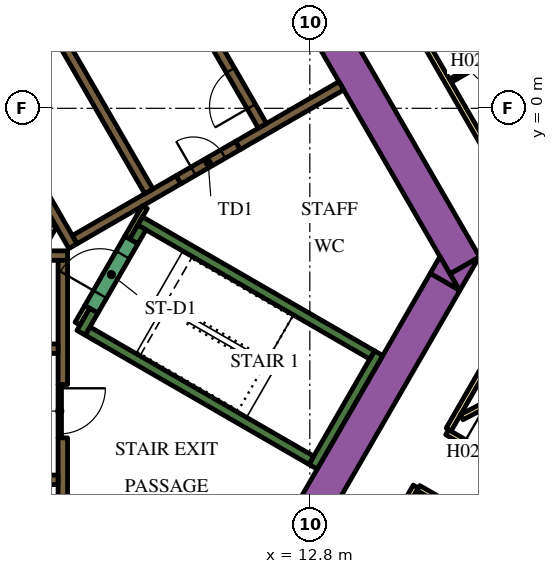
"""IFC4 building model, lengths in metres.
Left out: names, types, materials, properties, quantities, classifications, styles, units other than length and angle.
Written with IfcOpenShell. Run it as: python <this file> out.ifc"""

import sys

from ifc_helpers import new_model, si_unit, direction, frame, frame_2d, origin, place, context, subcontext, project, spatial, polyline, rectangle, outline, extrude, element, fill, save


model = new_model("IFC4")
c1 = context("Model", 3, precision=1e-05, world=origin(), true_north=direction((0.0, 1.0)))
c2 = subcontext(c1, "Body", "Model", "MODEL_VIEW")
j1 = project(units=[si_unit("LENGTHUNIT", "METRE"), si_unit("PLANEANGLEUNIT", "RADIAN")], contexts=[c1])
p1 = place(None, origin())
s1 = spatial("IfcSite", under=j1, at=p1, CompositionType="ELEMENT")
p2 = place(p1, origin())
s2 = spatial("IfcBuilding", under=s1, at=p2, CompositionType="ELEMENT")
p3 = place(p2, frame((0.0, 0.0, 39.3)))
s3 = spatial("IfcBuildingStorey", under=s2, at=p3, CompositionType="ELEMENT", Elevation=39.3)
p4 = place(p3, frame((6.711, 13.476, 0.0), z_axis=(0.0, 0.0, 1.0), x_axis=(0.500002723396, -0.866023831425, 0.0)))
e1 = element("IfcWall", 1, at=p4, inside=s3, PredefinedType="SOLIDWALL", context=c2, shape_type="SweptSolid", body=[
    extrude(rectangle(XDim=20.334, YDim=0.9, at=frame_2d((10.167, 0.0))), origin(), (0.0, 0.0, 1.0), 3.9),
])
p5 = place(p3, origin())
e2 = element("IfcWall", 2, at=p5, inside=s3, PredefinedType="SOLIDWALL", context=c2, shape_type="SweptSolid", body=[
    extrude(outline(polyline([(16.743, -4.8), (16.489, -4.36), (17.251, -3.92), (16.743, -4.8)])), origin(), (0.0, 0.0, 1.0), 3.9),
])
p6 = place(p3, frame((11.695, -12.644, 0.0), z_axis=(0.0, 0.0, 1.0), x_axis=(0.500010229568, 0.86601949766, 0.0)))
e3 = element("IfcWall", 3, at=p6, inside=s3, PredefinedType="SOLIDWALL", context=c2, shape_type="SweptSolid", body=[
    extrude(rectangle(XDim=9.326, YDim=0.9, at=frame_2d((4.663, 0.0))), origin(), (0.0, 0.0, 1.0), 3.9),
])
e4 = element("IfcWall", 4, at=p5, inside=s3, PredefinedType="SOLIDWALL", context=c2, shape_type="SweptSolid", body=[
    extrude(outline(polyline([(16.223, -3.9), (16.732, -4.78), (15.969, -4.34), (16.223, -3.9)])), origin(), (0.0, 0.0, 1.0), 3.9),
])
p7 = place(p3, frame((12.885, -9.431, 0.0), z_axis=(0.0, 0.0, 1.0), x_axis=(0.500020560727, 0.866013532718, 0.0)))
e5 = element("IfcWall", 5, at=p7, inside=s3, PredefinedType="SOLIDWALL", context=c2, shape_type="SweptSolid", body=[
    extrude(rectangle(XDim=3.45, YDim=0.25, at=frame_2d((1.725, 0.0))), origin(), (0.0, 0.0, 1.0), 3.9),
])
p8 = place(p3, frame((12.84, -9.261, 0.0), z_axis=(0.0, 0.0, 1.0), x_axis=(-0.866013990052, 0.500019768644, 0.0)))
e6 = element("IfcWall", 6, at=p8, inside=s3, PredefinedType="SOLIDWALL", context=c2, shape_type="SweptSolid", body=[
    extrude(rectangle(XDim=6.8, YDim=0.25, at=frame_2d((3.4, 0.0))), origin(), (0.0, 0.0, 1.0), 3.9),
])
p9 = place(p3, frame((6.78, -5.906, 0.0), z_axis=(0.0, 0.0, 1.0), x_axis=(0.500223362819, 0.865896406789, 0.0)))
e7 = element("IfcWall", 7, at=p9, inside=s3, PredefinedType="SOLIDWALL", context=c2, shape_type="SweptSolid", body=[
    extrude(rectangle(XDim=0.675, YDim=0.25, at=frame_2d((0.337, 0.0))), origin(), (0.0, 0.0, 1.0), 3.9),
])
p10 = place(p3, frame((8.334, -2.964, 0.0), z_axis=(0.0, 0.0, 1.0), x_axis=(0.866016039709, -0.500016218704, 0.0)))
e8 = element("IfcWall", 8, at=p10, inside=s3, PredefinedType="SOLIDWALL", context=c2, shape_type="SweptSolid", body=[
    extrude(rectangle(XDim=7.05, YDim=0.25, at=frame_2d((3.525, 0.0))), origin(), (0.0, 0.0, 1.0), 3.9),
])
p11 = place(p3, frame((8.168, -3.503, 0.0), z_axis=(0.0, 0.0, 1.0), x_axis=(0.49972245349, 0.866185586049, 0.0)))
e9 = element("IfcWall", 9, at=p11, inside=s3, PredefinedType="SOLIDWALL", context=c2, shape_type="SweptSolid", body=[
    extrude(rectangle(XDim=0.425, YDim=0.25, at=frame_2d((0.212, 0.0))), origin(), (0.0, 0.0, 1.0), 3.9),
])
p12 = place(p3, frame((-5.545, -3.875, 0.0), z_axis=(0.0, 0.0, 1.0), x_axis=(1.0, 0.0, 0.0)))
e10 = element("IfcWall", 10, at=p12, inside=s3, PredefinedType="SOLIDWALL", context=c2, shape_type="SweptSolid", body=[
    extrude(rectangle(XDim=11.97, YDim=0.25, at=frame_2d((5.985, 0.0))), origin(), (0.0, 0.0, 1.0), 3.9),
])
p13 = place(p3, frame((6.3, -8.67, 0.0), z_axis=(0.0, 0.0, 1.0), x_axis=(0.0, -1.0, 0.0)))
e11 = element("IfcWall", 11, at=p13, inside=s3, PredefinedType="SOLIDWALL", context=c2, shape_type="SweptSolid", body=[
    extrude(rectangle(XDim=3.43, YDim=0.25, at=frame_2d((1.715, 0.0))), origin(), (0.0, 0.0, 1.0), 3.9),
])
p14 = place(p3, frame((6.3, -7.268, 0.0), z_axis=(0.0, 0.0, 1.0), x_axis=(0.0, 1.0, 0.0)))
e12 = element("IfcWall", 12, at=p14, inside=s3, PredefinedType="SOLIDWALL", context=c2, shape_type="SweptSolid", body=[
    extrude(rectangle(XDim=3.268, YDim=0.25, at=frame_2d((1.634, 0.0))), origin(), (0.0, 0.0, 1.0), 3.9),
])
p15 = place(p3, frame((13.629, 0.594, 0.0), z_axis=(0.0, 0.0, 1.0), x_axis=(-0.86602790099, -0.499995674689, 0.0)))
e13 = element("IfcWall", 13, at=p15, inside=s3, PredefinedType="SOLIDWALL", context=c2, shape_type="SweptSolid", body=[
    extrude(rectangle(XDim=3.146, YDim=0.25, at=frame_2d((1.573, 0.0))), origin(), (0.0, 0.0, 1.0), 3.9),
])
e14 = element("IfcWall", 14, at=p5, inside=s3, PredefinedType="SOLIDWALL", context=c2, shape_type="SweptSolid", body=[
    extrude(outline(polyline([(0.566, 6.725), (0.566, 6.875), (0.566, 6.875), (0.565, 6.875), (0.361, 6.875), (0.035, 7.439), (0.252, 7.564), (0.377, 7.348), (6.552, -3.348), (6.677, -3.564), (6.46, -3.689), (0.448, 6.725), (0.565, 6.725), (0.566, 6.725), (0.566, 6.725)])), origin(), (0.0, 0.0, 1.0), 3.9),
])
p16 = place(p3, frame((6.614, -3.456, 0.0), z_axis=(0.0, 0.0, 1.0), x_axis=(0.86602447079, 0.500001615989, 0.0)))
e15 = element("IfcWall", 15, at=p16, inside=s3, PredefinedType="SOLIDWALL", context=c2, shape_type="SweptSolid", body=[
    extrude(rectangle(XDim=3.154, YDim=0.25, at=frame_2d((1.577, 0.0))), origin(), (0.0, 0.0, 1.0), 3.9),
])
p17 = place(p3, frame((6.945, -5.222, 0.0), z_axis=(0.0, 0.0, 1.0), x_axis=(-0.499818422106, -0.866130212453, 0.0)))
e16 = element("IfcWall", 16, at=p17, inside=s3, PredefinedType="PARTITIONING", context=c2, shape_type="SweptSolid", body=[
    extrude(rectangle(XDim=0.514, YDim=0.15, at=frame_2d((0.257, 0.0))), origin(), (0.0, 0.0, 1.0), 2.75),
])
p18 = place(p3, frame((5.705, -3.718, 0.0), z_axis=(0.0, 0.0, 1.0), x_axis=(0.499962090823, 0.866047289552, 0.0)))
e17 = element("IfcWall", 17, at=p18, inside=s3, PredefinedType="PARTITIONING", context=c2, shape_type="SweptSolid", body=[
    extrude(rectangle(XDim=0.735, YDim=0.15, at=frame_2d((0.367, 0.0))), origin(), (0.0, 0.0, 1.0), 2.75),
])
p19 = place(p3, frame((8.459, -2.599, 0.0), z_axis=(0.0, 0.0, 1.0), x_axis=(-0.500041054325, -0.866001699761, 0.0)))
e18 = element("IfcWall", 18, at=p19, inside=s3, PredefinedType="PARTITIONING", context=c2, shape_type="SweptSolid", body=[
    extrude(rectangle(XDim=0.929, YDim=0.15, at=frame_2d((0.464, 0.0))), origin(), (0.0, 0.0, 1.0), 3.9),
])
p20 = place(p3, frame((-6.175, -9.775, 0.0), z_axis=(0.0, 0.0, 1.0), x_axis=(1.0, 0.0, 0.0)))
e19 = element("IfcWall", 19, at=p20, inside=s3, PredefinedType="SOLIDWALL", context=c2, shape_type="SweptSolid", body=[
    extrude(rectangle(XDim=12.35, YDim=0.25, at=frame_2d((6.175, 0.0))), origin(), (0.0, 0.0, 1.0), 3.9),
])
p21 = place(p20, frame((0.585, 0.0, 0.0)))
e20 = element("IfcOpeningElement", 20, at=p21, cuts=e19, PredefinedType="OPENING", context=c2, shape_type="SweptSolid", body=[
    extrude(rectangle(XDim=1.1, YDim=2.1, at=frame_2d((0.55, 1.05))), frame((0.0, 0.135, 0.0), z_axis=(0.0, -1.0, 0.0), x_axis=(1.0, 0.0, 0.0)), (0.0, 0.0, 1.0), 0.27),
])
p22 = place(p20, frame((3.105, 0.0, 0.0)))
e21 = element("IfcOpeningElement", 21, at=p22, cuts=e19, PredefinedType="OPENING", context=c2, shape_type="SweptSolid", body=[
    extrude(rectangle(XDim=1.1, YDim=2.1, at=frame_2d((0.55, 1.05))), frame((0.0, 0.135, 0.0), z_axis=(0.0, -1.0, 0.0), x_axis=(1.0, 0.0, 0.0)), (0.0, 0.0, 1.0), 0.27),
])
p23 = place(p20, frame((5.625, 0.0, 0.0)))
e22 = element("IfcOpeningElement", 22, at=p23, cuts=e19, PredefinedType="OPENING", context=c2, shape_type="SweptSolid", body=[
    extrude(rectangle(XDim=1.1, YDim=2.1, at=frame_2d((0.55, 1.05))), frame((0.0, 0.135, 0.0), z_axis=(0.0, -1.0, 0.0), x_axis=(1.0, 0.0, 0.0)), (0.0, 0.0, 1.0), 0.27),
])
p24 = place(p20, frame((8.145, 0.0, 0.0)))
e23 = element("IfcOpeningElement", 23, at=p24, cuts=e19, PredefinedType="OPENING", context=c2, shape_type="SweptSolid", body=[
    extrude(rectangle(XDim=1.1, YDim=2.1, at=frame_2d((0.55, 1.05))), frame((0.0, 0.135, 0.0), z_axis=(0.0, -1.0, 0.0), x_axis=(1.0, 0.0, 0.0)), (0.0, 0.0, 1.0), 0.27),
])
p25 = place(p20, frame((10.665, 0.0, 0.0)))
e24 = element("IfcOpeningElement", 24, at=p25, cuts=e19, PredefinedType="OPENING", context=c2, shape_type="SweptSolid", body=[
    extrude(rectangle(XDim=1.1, YDim=2.1, at=frame_2d((0.55, 1.05))), frame((0.0, 0.135, 0.0), z_axis=(0.0, -1.0, 0.0), x_axis=(1.0, 0.0, 0.0)), (0.0, 0.0, 1.0), 0.27),
])
p26 = place(p3, frame((-6.175, -6.325, 0.0), z_axis=(0.0, 0.0, 1.0), x_axis=(1.0, 0.0, 0.0)))
e25 = element("IfcWall", 25, at=p26, inside=s3, PredefinedType="SOLIDWALL", context=c2, shape_type="SweptSolid", body=[
    extrude(rectangle(XDim=12.35, YDim=0.25, at=frame_2d((6.175, 0.0))), origin(), (0.0, 0.0, 1.0), 3.9),
])
p27 = place(p26, frame((3.205, 0.0, 0.0)))
e26 = element("IfcOpeningElement", 26, at=p27, cuts=e25, PredefinedType="OPENING", context=c2, shape_type="SweptSolid", body=[
    extrude(rectangle(XDim=0.9, YDim=2.1, at=frame_2d((0.45, 1.05))), frame((0.0, 0.135, 0.0), z_axis=(0.0, -1.0, 0.0), x_axis=(1.0, 0.0, 0.0)), (0.0, 0.0, 1.0), 0.27),
])
p28 = place(p26, frame((8.145, 0.0, 0.0)))
e27 = element("IfcOpeningElement", 27, at=p28, cuts=e25, PredefinedType="OPENING", context=c2, shape_type="SweptSolid", body=[
    extrude(rectangle(XDim=1.1, YDim=2.1, at=frame_2d((0.55, 1.05))), frame((0.0, 0.135, 0.0), z_axis=(0.0, -1.0, 0.0), x_axis=(1.0, 0.0, 0.0)), (0.0, 0.0, 1.0), 0.27),
])
p29 = place(p26, frame((10.665, 0.0, 0.0)))
e28 = element("IfcOpeningElement", 28, at=p29, cuts=e25, PredefinedType="OPENING", context=c2, shape_type="SweptSolid", body=[
    extrude(rectangle(XDim=1.1, YDim=2.1, at=frame_2d((0.55, 1.05))), frame((0.0, 0.135, 0.0), z_axis=(0.0, -1.0, 0.0), x_axis=(1.0, 0.0, 0.0)), (0.0, 0.0, 1.0), 0.27),
])
p30 = place(p3, frame((11.553, -0.46, 0.0), z_axis=(0.0, 0.0, 1.0), x_axis=(-0.500006514828, 0.866021642414, 0.0)))
e29 = element("IfcWall", 29, at=p30, inside=s3, PredefinedType="SOLIDWALL", context=c2, shape_type="SweptSolid", body=[
    extrude(rectangle(XDim=12.35, YDim=0.25, at=frame_2d((6.175, 0.0))), origin(), (0.0, 0.0, 1.0), 3.9),
])
p31 = place(p30, frame((0.585, 0.0, 0.0)))
e30 = element("IfcOpeningElement", 30, at=p31, cuts=e29, PredefinedType="OPENING", context=c2, shape_type="SweptSolid", body=[
    extrude(rectangle(XDim=1.1, YDim=2.1, at=frame_2d((0.55, 1.05))), frame((0.0, 0.135, 0.0), z_axis=(0.0, -1.0, 0.0), x_axis=(1.0, 0.0, 0.0)), (0.0, 0.0, 1.0), 0.27),
])
p32 = place(p30, frame((3.105, 0.0, 0.0)))
e31 = element("IfcOpeningElement", 31, at=p32, cuts=e29, PredefinedType="OPENING", context=c2, shape_type="SweptSolid", body=[
    extrude(rectangle(XDim=1.1, YDim=2.1, at=frame_2d((0.55, 1.05))), frame((0.0, 0.135, 0.0), z_axis=(0.0, -1.0, 0.0), x_axis=(1.0, 0.0, 0.0)), (0.0, 0.0, 1.0), 0.27),
])
p33 = place(p30, frame((5.625, 0.0, 0.0)))
e32 = element("IfcOpeningElement", 32, at=p33, cuts=e29, PredefinedType="OPENING", context=c2, shape_type="SweptSolid", body=[
    extrude(rectangle(XDim=1.1, YDim=2.1, at=frame_2d((0.55, 1.05))), frame((0.0, 0.135, 0.0), z_axis=(0.0, -1.0, 0.0), x_axis=(1.0, 0.0, 0.0)), (0.0, 0.0, 1.0), 0.27),
])
p34 = place(p3, frame((8.565, -2.185, 0.0), z_axis=(0.0, 0.0, 1.0), x_axis=(-0.499997954832, 0.866026584559, 0.0)))
e33 = element("IfcWall", 33, at=p34, inside=s3, PredefinedType="SOLIDWALL", context=c2, shape_type="SweptSolid", body=[
    extrude(rectangle(XDim=12.35, YDim=0.25, at=frame_2d((6.175, 0.0))), origin(), (0.0, 0.0, 1.0), 3.9),
])
p35 = place(p34, frame((5.725, 0.0, 0.0)))
e34 = element("IfcOpeningElement", 34, at=p35, cuts=e33, PredefinedType="OPENING", context=c2, shape_type="SweptSolid", body=[
    extrude(rectangle(XDim=0.9, YDim=2.1, at=frame_2d((0.45, 1.05))), frame((0.0, 0.135, 0.0), z_axis=(0.0, -1.0, 0.0), x_axis=(1.0, 0.0, 0.0)), (0.0, 0.0, 1.0), 0.27),
])
p36 = place(p3, frame((7.053, -5.284, 0.0), z_axis=(0.0, 0.0, 1.0), x_axis=(0.500078061341, 0.865980330357, 0.0)))
e35 = element("IfcWall", 35, at=p36, inside=s3, PredefinedType="SOLIDWALL", context=c2, shape_type="SweptSolid", body=[
    extrude(rectangle(XDim=2.1, YDim=0.4, at=frame_2d((1.05, 0.0))), origin(), (0.0, 0.0, 1.0), 3.9),
])
p37 = place(p36, frame((0.45, 0.0, 0.0)))
e36 = element("IfcOpeningElement", 36, at=p37, cuts=e35, PredefinedType="OPENING", context=c2, shape_type="SweptSolid", body=[
    extrude(rectangle(XDim=1.2, YDim=2.1, at=frame_2d((0.6, 1.05))), frame((0.0, 0.21, 0.0), z_axis=(0.0, -1.0, 0.0), x_axis=(1.0, 0.0, 0.0)), (0.0, 0.0, 1.0), 0.42),
])
p38 = place(p3, frame((9.346, -1.879, 0.0), z_axis=(0.0, 0.0, 1.0), x_axis=(0.866047807691, 0.499961193289, 0.0)))
e37 = element("IfcWall", 37, at=p38, inside=s3, PredefinedType="SOLIDWALL", context=c2, shape_type="SweptSolid", body=[
    extrude(rectangle(XDim=1.8, YDim=0.25, at=frame_2d((0.9, 0.0))), origin(), (0.0, 0.0, 1.0), 3.9),
])
p39 = place(p38, frame((0.45, 0.0, 0.0)))
e38 = element("IfcOpeningElement", 38, at=p39, cuts=e37, PredefinedType="OPENING", context=c2, shape_type="SweptSolid", body=[
    extrude(rectangle(XDim=0.9, YDim=2.1, at=frame_2d((0.45, 1.05))), frame((0.0, 0.135, 0.0), z_axis=(0.0, -1.0, 0.0), x_axis=(1.0, 0.0, 0.0)), (0.0, 0.0, 1.0), 0.27),
])
p40 = place(p3, frame((6.22, -7.266, 0.0), z_axis=(0.0, 0.0, 1.0), x_axis=(0.0, -1.0, 0.0)))
e39 = element("IfcWall", 39, at=p40, inside=s3, PredefinedType="PARTITIONING", context=c2, shape_type="SweptSolid", body=[
    extrude(rectangle(XDim=1.4, YDim=0.09, at=frame_2d((0.7, 0.0))), origin(), (0.0, 0.0, 1.0), 2.75),
])
p41 = place(p40, frame((0.1, 0.0, 0.0)))
e40 = element("IfcOpeningElement", 40, at=p41, cuts=e39, PredefinedType="OPENING", context=c2, shape_type="SweptSolid", body=[
    extrude(rectangle(XDim=1.2, YDim=2.1, at=frame_2d((0.6, 1.05))), frame((0.0, 0.055, 0.0), z_axis=(0.0, -1.0, 0.0), x_axis=(1.0, 0.0, 0.0)), (0.0, 0.0, 1.0), 0.11),
])
p42 = place(p3, frame((16.412, -8.523, 0.0), z_axis=(0.0, 0.0, 1.0), x_axis=(0.866022197818, -0.500005552856, 0.0)))
e41 = element("IfcWall", 41, at=p42, inside=s3, PredefinedType="PARTITIONING", context=c2, shape_type="SweptSolid", body=[
    extrude(rectangle(XDim=16.224, YDim=0.15, at=frame_2d((8.112, 0.0))), origin(), (0.0, 0.0, 1.0), 2.75),
])
p43 = place(p42, frame((7.949, 0.0, 0.0)))
e42 = element("IfcOpeningElement", 42, at=p43, cuts=e41, PredefinedType="OPENING", context=c2, shape_type="SweptSolid", body=[
    extrude(rectangle(XDim=1.0, YDim=2.1, at=frame_2d((0.5, 1.05))), frame((0.0, 0.085, 0.0), z_axis=(0.0, -1.0, 0.0), x_axis=(1.0, 0.0, 0.0)), (0.0, 0.0, 1.0), 0.17),
])
p44 = place(p42, frame((0.526, 0.0, 0.0)))
e43 = element("IfcOpeningElement", 43, at=p44, cuts=e41, PredefinedType="OPENING", context=c2, shape_type="SweptSolid", body=[
    extrude(rectangle(XDim=1.0, YDim=2.1, at=frame_2d((0.5, 1.05))), frame((0.0, 0.085, 0.0), z_axis=(0.0, -1.0, 0.0), x_axis=(1.0, 0.0, 0.0)), (0.0, 0.0, 1.0), 0.17),
])
p45 = place(p3, frame((19.081, -3.9, 0.0), z_axis=(0.0, 0.0, 1.0), x_axis=(-0.499974327079, -0.866040225545, 0.0)))
e44 = element("IfcWall", 44, at=p45, inside=s3, PredefinedType="PARTITIONING", context=c2, shape_type="SweptSolid", body=[
    extrude(rectangle(XDim=5.258, YDim=0.15, at=frame_2d((2.629, 0.0))), origin(), (0.0, 0.0, 1.0), 2.75),
])
p46 = place(p3, frame((6.163, 18.475, 0.0), z_axis=(0.0, 0.0, 1.0), x_axis=(0.500001317485, -0.866024643133, 0.0)))
e45 = element("IfcWall", 45, at=p46, inside=s3, PredefinedType="PARTITIONING", context=c2, shape_type="SweptSolid", body=[
    extrude(rectangle(XDim=25.767, YDim=0.15, at=frame_2d((12.883, 0.0))), origin(), (0.0, 0.0, 1.0), 2.75),
])
p47 = place(p46, frame((24.586, 0.0, 0.0)))
e46 = element("IfcOpeningElement", 46, at=p47, cuts=e45, PredefinedType="OPENING", context=c2, shape_type="SweptSolid", body=[
    extrude(rectangle(XDim=1.0, YDim=2.1, at=frame_2d((0.5, 1.05))), frame((0.0, 0.085, 0.0), z_axis=(0.0, -1.0, 0.0), x_axis=(1.0, 0.0, 0.0)), (0.0, 0.0, 1.0), 0.17),
])
p48 = place(p46, frame((16.196, 0.0, 0.0)))
e47 = element("IfcOpeningElement", 47, at=p48, cuts=e45, PredefinedType="OPENING", context=c2, shape_type="SweptSolid", body=[
    extrude(rectangle(XDim=1.0, YDim=2.1, at=frame_2d((0.5, 1.05))), frame((0.0, 0.085, 0.0), z_axis=(0.0, -1.0, 0.0), x_axis=(1.0, 0.0, 0.0)), (0.0, 0.0, 1.0), 0.17),
])
p49 = place(p46, frame((14.789, 0.0, 0.0)))
e48 = element("IfcOpeningElement", 48, at=p49, cuts=e45, PredefinedType="OPENING", context=c2, shape_type="SweptSolid", body=[
    extrude(rectangle(XDim=1.1, YDim=2.1, at=frame_2d((0.55, 1.05))), frame((0.0, 0.085, 0.0), z_axis=(0.0, -1.0, 0.0), x_axis=(1.0, 0.0, 0.0)), (0.0, 0.0, 1.0), 0.17),
])
p50 = place(p46, frame((3.698, 0.0, 0.0)))
e49 = element("IfcOpeningElement", 49, at=p50, cuts=e45, PredefinedType="OPENING", context=c2, shape_type="SweptSolid", body=[
    extrude(rectangle(XDim=1.0, YDim=2.1, at=frame_2d((0.5, 1.05))), frame((0.0, 0.085, 0.0), z_axis=(0.0, -1.0, 0.0), x_axis=(1.0, 0.0, 0.0)), (0.0, 0.0, 1.0), 0.17),
])
p51 = place(p46, frame((2.391, 0.0, 0.0)))
e50 = element("IfcOpeningElement", 50, at=p51, cuts=e45, PredefinedType="OPENING", context=c2, shape_type="SweptSolid", body=[
    extrude(rectangle(XDim=1.0, YDim=2.1, at=frame_2d((0.5, 1.05))), frame((0.0, 0.085, 0.0), z_axis=(0.0, -1.0, 0.0), x_axis=(1.0, 0.0, 0.0)), (0.0, 0.0, 1.0), 0.17),
])
p52 = place(p3, frame((15.587, -9.952, 0.0), z_axis=(0.0, 0.0, 1.0), x_axis=(-0.500016618951, -0.866015808616, 0.0)))
e51 = element("IfcWall", 51, at=p52, inside=s3, PredefinedType="PARTITIONING", context=c2, shape_type="SweptSolid", body=[
    extrude(rectangle(XDim=5.268, YDim=0.15, at=frame_2d((2.634, 0.0))), origin(), (0.0, 0.0, 1.0), 2.75),
])
p53 = place(p52, frame((2.465, 0.0, 0.0)))
e52 = element("IfcOpeningElement", 52, at=p53, cuts=e51, PredefinedType="OPENING", context=c2, shape_type="SweptSolid", body=[
    extrude(rectangle(XDim=0.9, YDim=2.1, at=frame_2d((0.45, 1.05))), frame((0.0, 0.085, 0.0), z_axis=(0.0, -1.0, 0.0), x_axis=(1.0, 0.0, 0.0)), (0.0, 0.0, 1.0), 0.17),
])
p54 = place(p3, frame((29.638, -18.064, 0.0), z_axis=(0.0, 0.0, 1.0), x_axis=(-0.866026175601, 0.499998663172, 0.0)))
e53 = element("IfcWall", 53, at=p54, inside=s3, PredefinedType="PARTITIONING", context=c2, shape_type="SweptSolid", body=[
    extrude(rectangle(XDim=16.144, YDim=0.15, at=frame_2d((8.072, 0.0))), origin(), (0.0, 0.0, 1.0), 2.75),
])
p55 = place(p54, frame((13.948, 0.0, 0.0)))
e54 = element("IfcOpeningElement", 54, at=p55, cuts=e53, PredefinedType="OPENING", context=c2, shape_type="SweptSolid", body=[
    extrude(rectangle(XDim=0.9, YDim=2.1, at=frame_2d((0.45, 1.05))), frame((0.0, 0.085, 0.0), z_axis=(0.0, -1.0, 0.0), x_axis=(1.0, 0.0, 0.0)), (0.0, 0.0, 1.0), 0.17),
])
p56 = place(p54, frame((11.004, 0.0, 0.0)))
e55 = element("IfcOpeningElement", 55, at=p56, cuts=e53, PredefinedType="OPENING", context=c2, shape_type="SweptSolid", body=[
    extrude(rectangle(XDim=1.0, YDim=2.1, at=frame_2d((0.5, 1.05))), frame((0.0, 0.085, 0.0), z_axis=(0.0, -1.0, 0.0), x_axis=(1.0, 0.0, 0.0)), (0.0, 0.0, 1.0), 0.17),
])
p57 = place(p3, frame((27.134, -2.779, 0.0), z_axis=(0.0, 0.0, 1.0), x_axis=(-0.8882049501, -0.459447457951, 0.0)))
e56 = element("IfcWall", 56, at=p57, inside=s3, PredefinedType="PARTITIONING", context=c2, shape_type="SweptSolid", body=[
    extrude(rectangle(XDim=11.638, YDim=0.15, at=frame_2d((5.819, 0.0))), origin(), (0.0, 0.0, 1.0), 2.75),
])
p58 = place(p3, frame((18.749, 2.026, 0.0), z_axis=(0.0, 0.0, 1.0), x_axis=(-0.866021400173, -0.500006934395, 0.0)))
e57 = element("IfcWall", 57, at=p58, inside=s3, PredefinedType="PARTITIONING", context=c2, shape_type="SweptSolid", body=[
    extrude(rectangle(XDim=2.6, YDim=0.1, at=frame_2d((1.3, 0.0))), origin(), (0.0, 0.0, 1.0), 2.75),
])
p59 = place(p58, frame((1.1, 0.0, 0.0)))
e58 = element("IfcOpeningElement", 58, at=p59, cuts=e57, PredefinedType="OPENING", context=c2, shape_type="SweptSolid", body=[
    extrude(rectangle(XDim=0.9, YDim=2.1, at=frame_2d((0.45, 1.05))), frame((0.0, 0.06, 0.0), z_axis=(0.0, -1.0, 0.0), x_axis=(1.0, 0.0, 0.0)), (0.0, 0.0, 1.0), 0.12),
])
p60 = place(p31, origin())
e59 = element("IfcDoor", 59, at=p60, inside=s3, OperationType="DOUBLE_DOOR_SLIDING", PredefinedType="DOOR", context=c2, shape_type="SweptSolid", body=[
    extrude(rectangle(XDim=1.1, YDim=2.1, at=frame_2d((0.55, 1.05))), frame((0.0, 0.025, 0.0), z_axis=(0.0, -1.0, 0.0), x_axis=(1.0, 0.0, 0.0)), (0.0, 0.0, 1.0), 0.05),
])
fill(e30, e59)
p61 = place(p37, origin())
e60 = element("IfcDoor", 60, at=p61, inside=s3, OperationType="SINGLE_SWING_LEFT", PredefinedType="DOOR", context=c2, shape_type="SweptSolid", body=[
    extrude(rectangle(XDim=1.2, YDim=2.1, at=frame_2d((0.6, 1.05))), frame((0.0, 0.025, 0.0), z_axis=(0.0, -1.0, 0.0), x_axis=(1.0, 0.0, 0.0)), (0.0, 0.0, 1.0), 0.05),
])
fill(e36, e60)
p62 = place(p39, origin())
e61 = element("IfcDoor", 61, at=p62, inside=s3, OperationType="SINGLE_SWING_LEFT", PredefinedType="DOOR", context=c2, shape_type="SweptSolid", body=[
    extrude(rectangle(XDim=0.9, YDim=2.1, at=frame_2d((0.45, 1.05))), frame((0.0, 0.025, 0.0), z_axis=(0.0, -1.0, 0.0), x_axis=(1.0, 0.0, 0.0)), (0.0, 0.0, 1.0), 0.05),
])
fill(e38, e61)
p63 = place(p41, origin())
e62 = element("IfcDoor", 62, at=p63, inside=s3, OperationType="SINGLE_SWING_LEFT", PredefinedType="DOOR", context=c2, shape_type="SweptSolid", body=[
    extrude(rectangle(XDim=1.2, YDim=2.1, at=frame_2d((0.6, 1.05))), frame((0.0, 0.025, 0.0), z_axis=(0.0, -1.0, 0.0), x_axis=(1.0, 0.0, 0.0)), (0.0, 0.0, 1.0), 0.05),
])
fill(e40, e62)
p64 = place(p44, origin())
e63 = element("IfcDoor", 63, at=p64, inside=s3, OperationType="SINGLE_SWING_LEFT", PredefinedType="DOOR", context=c2, shape_type="SweptSolid", body=[
    extrude(rectangle(XDim=1.0, YDim=2.1, at=frame_2d((0.5, 1.05))), frame((0.0, 0.025, 0.0), z_axis=(0.0, -1.0, 0.0), x_axis=(1.0, 0.0, 0.0)), (0.0, 0.0, 1.0), 0.05),
])
fill(e43, e63)
p65 = place(p59, origin())
e64 = element("IfcDoor", 64, at=p65, inside=s3, OperationType="SINGLE_SWING_LEFT", PredefinedType="DOOR", context=c2, shape_type="SweptSolid", body=[
    extrude(rectangle(XDim=0.9, YDim=2.1, at=frame_2d((0.45, 1.05))), frame((0.0, 0.025, 0.0), z_axis=(0.0, -1.0, 0.0), x_axis=(1.0, 0.0, 0.0)), (0.0, 0.0, 1.0), 0.05),
])
fill(e58, e64)
save(model, sys.argv[1])
